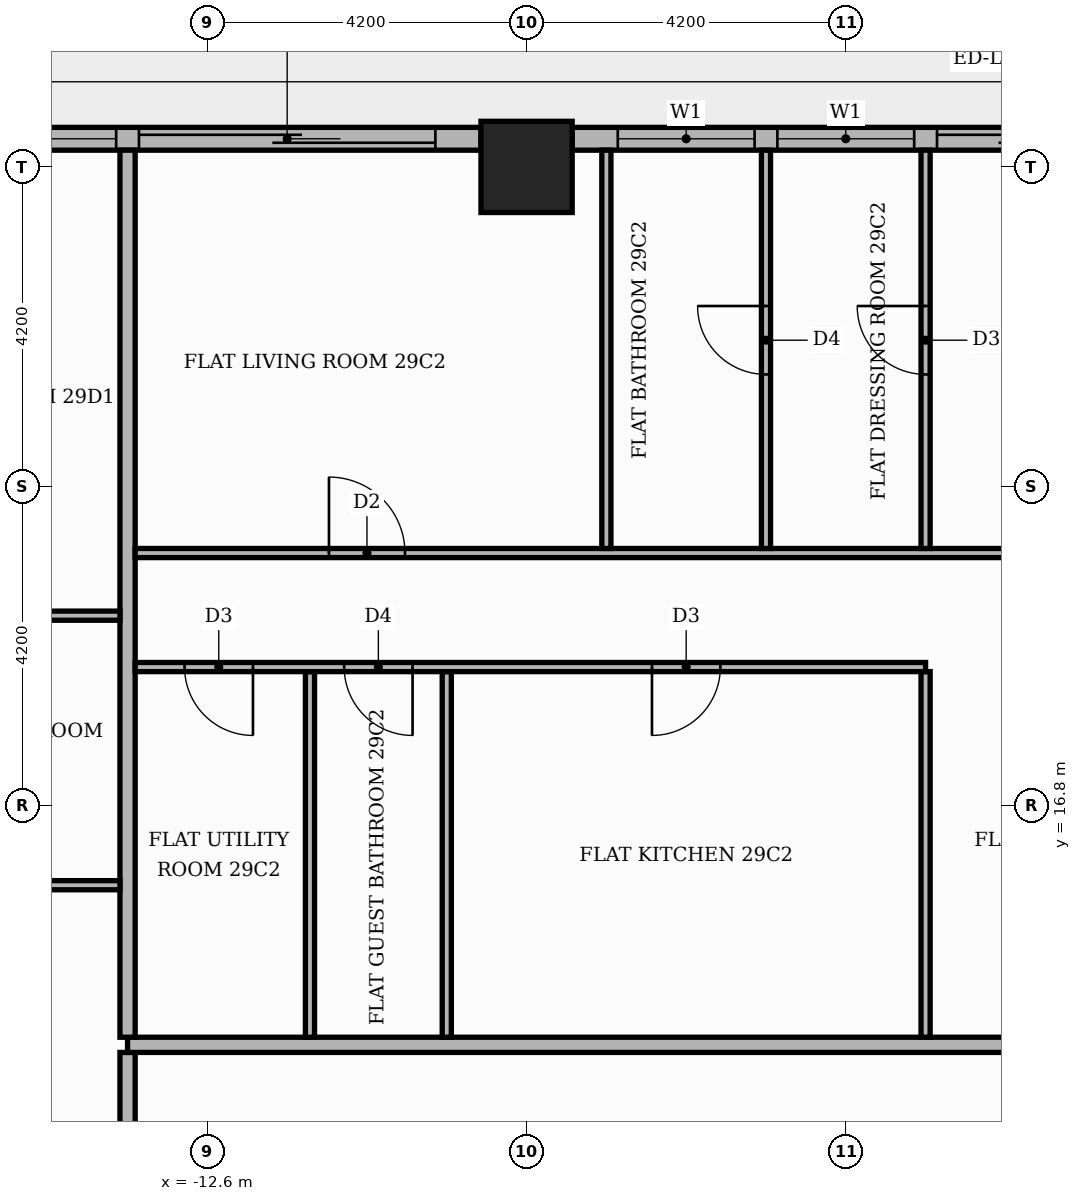
"""IFC4 building model, lengths in metres.
Left out: names, types, materials, properties, quantities, classifications, styles, units other than length and angle.
Written with IfcOpenShell. Run it as: python <this file> out.ifc"""

import sys

from ifc_helpers import new_model, si_unit, direction, frame, frame_2d, origin, origin_2d, place, context, subcontext, project, spatial, rectangle, extrude, element, fill, save


model = new_model("IFC4")
c1 = context("Model", 3, precision=1e-05, world=origin(), true_north=direction((0.0, 1.0)))
c2 = subcontext(c1, "Body", "Model", "MODEL_VIEW")
j1 = project(units=[si_unit("LENGTHUNIT", "METRE"), si_unit("PLANEANGLEUNIT", "RADIAN")], contexts=[c1])
p1 = place(None, origin())
s1 = spatial("IfcSite", under=j1, at=p1, CompositionType="ELEMENT")
p2 = place(p1, origin())
s2 = spatial("IfcBuilding", under=s1, at=p2, CompositionType="ELEMENT")
p3 = place(p2, frame((0.0, 0.0, 122.1)))
s3 = spatial("IfcBuildingStorey", under=s2, at=p3, CompositionType="ELEMENT", Elevation=122.1)
p4 = place(p3, frame((-8.4, 25.2, 0.0), z_axis=(0.0, 0.0, 1.0), x_axis=(1.0, 0.0, 0.0)))
e1 = element("IfcColumn", 1, at=p4, inside=s3, PredefinedType="COLUMN", context=c2, shape_type="SweptSolid", body=[
    extrude(rectangle(XDim=1.2, YDim=1.2, at=origin_2d()), origin(), (0.0, 0.0, 1.0), 3.9),
])
p5 = place(p3, frame((-0.6, 25.57, 0.0), z_axis=(0.0, 0.0, 1.0), x_axis=(-1.0, 0.0, 0.0)))
e2 = element("IfcWall", 2, at=p5, inside=s3, PredefinedType="STANDARD", context=c2, shape_type="SweptSolid", body=[
    extrude(rectangle(XDim=7.2, YDim=0.3, at=frame_2d((3.6, 0.0))), origin(), (0.0, 0.0, 1.0), 3.4),
])
p6 = place(p5, frame((0.6, 0.0, 0.0)))
e3 = element("IfcOpeningElement", 3, at=p6, cuts=e2, PredefinedType="OPENING", context=c2, shape_type="SweptSolid", body=[
    extrude(rectangle(XDim=1.8, YDim=2.4, at=frame_2d((0.9, 1.2))), frame((0.0, 0.16, 0.0), z_axis=(0.0, -1.0, 0.0), x_axis=(1.0, 0.0, 0.0)), (0.0, 0.0, 1.0), 0.32),
])
p7 = place(p5, frame((2.7, 0.0, 0.9)))
e4 = element("IfcOpeningElement", 4, at=p7, cuts=e2, PredefinedType="OPENING", context=c2, shape_type="SweptSolid", body=[
    extrude(rectangle(XDim=1.8, YDim=2.1, at=frame_2d((0.9, 1.05))), frame((0.0, 0.16, 0.0), z_axis=(0.0, -1.0, 0.0), x_axis=(1.0, 0.0, 0.0)), (0.0, 0.0, 1.0), 0.32),
])
p8 = place(p5, frame((4.8, 0.0, 0.9)))
e5 = element("IfcOpeningElement", 5, at=p8, cuts=e2, PredefinedType="OPENING", context=c2, shape_type="SweptSolid", body=[
    extrude(rectangle(XDim=1.8, YDim=2.1, at=frame_2d((0.9, 1.05))), frame((0.0, 0.16, 0.0), z_axis=(0.0, -1.0, 0.0), x_axis=(1.0, 0.0, 0.0)), (0.0, 0.0, 1.0), 0.32),
])
p9 = place(p3, frame((-9.0, 25.57, 0.0), z_axis=(0.0, 0.0, 1.0), x_axis=(-1.0, 0.0, 0.0)))
e6 = element("IfcWall", 6, at=p9, inside=s3, PredefinedType="STANDARD", context=c2, shape_type="SweptSolid", body=[
    extrude(rectangle(XDim=7.2, YDim=0.3, at=frame_2d((3.6, 0.0))), origin(), (0.0, 0.0, 1.0), 3.4),
])
p10 = place(p9, frame((0.6, 0.0, 0.0)))
e7 = element("IfcOpeningElement", 7, at=p10, cuts=e6, PredefinedType="OPENING", context=c2, shape_type="SweptSolid", body=[
    extrude(rectangle(XDim=3.9, YDim=2.4, at=frame_2d((1.95, 1.2))), frame((0.0, 0.16, 0.0), z_axis=(0.0, -1.0, 0.0), x_axis=(1.0, 0.0, 0.0)), (0.0, 0.0, 1.0), 0.32),
])
p11 = place(p9, frame((4.8, 0.0, 0.9)))
e8 = element("IfcOpeningElement", 8, at=p11, cuts=e6, PredefinedType="OPENING", context=c2, shape_type="SweptSolid", body=[
    extrude(rectangle(XDim=1.8, YDim=2.1, at=frame_2d((0.9, 1.05))), frame((0.0, 0.16, 0.0), z_axis=(0.0, -1.0, 0.0), x_axis=(1.0, 0.0, 0.0)), (0.0, 0.0, 1.0), 0.32),
])
p12 = place(p3, frame((-13.65, 5.35, 0.0), z_axis=(0.0, 0.0, 1.0), x_axis=(0.0, 1.0, 0.0)))
e9 = element("IfcWall", 9, at=p12, inside=s3, PredefinedType="PARTITIONING", context=c2, shape_type="SweptSolid", body=[
    extrude(rectangle(XDim=8.2, YDim=0.2, at=frame_2d((4.1, 0.0))), origin(), (0.0, 0.0, 1.0), 3.4),
])
p13 = place(p12, frame((5.65, 0.0, 0.0)))
e10 = element("IfcOpeningElement", 10, at=p13, cuts=e9, PredefinedType="OPENING", context=c2, shape_type="SweptSolid", body=[
    extrude(rectangle(XDim=1.1, YDim=2.4, at=frame_2d((0.55, 1.2))), frame((0.0, 0.11, 0.0), z_axis=(0.0, -1.0, 0.0), x_axis=(1.0, 0.0, 0.0)), (0.0, 0.0, 1.0), 0.22),
])
p14 = place(p3, frame((-13.65, 13.65, 0.0), z_axis=(0.0, 0.0, 1.0), x_axis=(1.0, 0.0, 0.0)))
e11 = element("IfcWall", 11, at=p14, inside=s3, PredefinedType="PARTITIONING", context=c2, shape_type="SweptSolid", body=[
    extrude(rectangle(XDim=39.07, YDim=0.2, at=frame_2d((19.535, 0.0))), origin(), (0.0, 0.0, 1.0), 3.4),
])
p15 = place(p14, frame((24.65, 0.0, 0.0)))
e12 = element("IfcOpeningElement", 12, at=p15, cuts=e11, PredefinedType="OPENING", context=c2, shape_type="SweptSolid", body=[
    extrude(rectangle(XDim=1.1, YDim=2.4, at=frame_2d((0.55, 1.2))), frame((0.0, 0.11, 0.0), z_axis=(0.0, -1.0, 0.0), x_axis=(1.0, 0.0, 0.0)), (0.0, 0.0, 1.0), 0.22),
])
p16 = place(p14, frame((12.05, 0.0, 0.0)))
e13 = element("IfcOpeningElement", 13, at=p16, cuts=e11, PredefinedType="OPENING", context=c2, shape_type="SweptSolid", body=[
    extrude(rectangle(XDim=1.1, YDim=2.4, at=frame_2d((0.55, 1.2))), frame((0.0, 0.11, 0.0), z_axis=(0.0, -1.0, 0.0), x_axis=(1.0, 0.0, 0.0)), (0.0, 0.0, 1.0), 0.22),
])
p17 = place(p3, frame((-13.65, 13.75, 0.0), z_axis=(0.0, 0.0, 1.0), x_axis=(0.0, 1.0, 0.0)))
e14 = element("IfcWall", 14, at=p17, inside=s3, PredefinedType="PARTITIONING", context=c2, shape_type="SweptSolid", body=[
    extrude(rectangle(XDim=11.67, YDim=0.2, at=frame_2d((5.835, 0.0))), origin(), (0.0, 0.0, 1.0), 3.4),
])
for number, where, z_axis, x_axis in (
    (15, (-11.25, 13.75, 0.0), (0.0, 0.0, 1.0), (0.0, 1.0, 0.0)),
    (16, (-9.45, 13.75, 0.0), (0.0, 0.0, 1.0), (0.0, 1.0, 0.0)),
    (17, (-3.15, 13.75, 0.0), (0.0, 0.0, 1.0), (0.0, 1.0, 0.0)),
):
    element("IfcWall", number, at=place(p3, frame(where, z_axis=z_axis, x_axis=x_axis)), inside=s3, PredefinedType="PARTITIONING", context=c2, shape_type="SweptSolid", body=[
        extrude(rectangle(XDim=4.81, YDim=0.12, at=frame_2d((2.405, 0.0))), origin(), (0.0, 0.0, 1.0), 3.4),
    ])
p18 = place(p3, frame((-19.82, 15.75, 0.0), z_axis=(0.0, 0.0, 1.0), x_axis=(1.0, 0.0, 0.0)))
e18 = element("IfcWall", 18, at=p18, inside=s3, PredefinedType="PARTITIONING", context=c2, shape_type="SweptSolid", body=[
    extrude(rectangle(XDim=6.07, YDim=0.12, at=frame_2d((3.035, 0.0))), origin(), (0.0, 0.0, 1.0), 3.4),
])
p19 = place(p18, frame((2.585, 0.0, 0.0)))
e19 = element("IfcOpeningElement", 19, at=p19, cuts=e18, PredefinedType="OPENING", context=c2, shape_type="SweptSolid", body=[
    extrude(rectangle(XDim=1.0, YDim=2.1, at=frame_2d((0.5, 1.05))), frame((0.0, 0.07, 0.0), z_axis=(0.0, -1.0, 0.0), x_axis=(1.0, 0.0, 0.0)), (0.0, 0.0, 1.0), 0.14),
])
p20 = place(p3, frame((-13.55, 18.62, 0.0), z_axis=(0.0, 0.0, 1.0), x_axis=(1.0, 0.0, 0.0)))
e20 = element("IfcWall", 20, at=p20, inside=s3, PredefinedType="PARTITIONING", context=c2, shape_type="SweptSolid", body=[
    extrude(rectangle(XDim=10.4, YDim=0.12, at=frame_2d((5.2, 0.0))), origin(), (0.0, 0.0, 1.0), 3.4),
])
p21 = place(p20, frame((6.8, 0.0, 0.0)))
e21 = element("IfcOpeningElement", 21, at=p21, cuts=e20, PredefinedType="OPENING", context=c2, shape_type="SweptSolid", body=[
    extrude(rectangle(XDim=0.9, YDim=2.1, at=frame_2d((0.45, 1.05))), frame((0.0, 0.07, 0.0), z_axis=(0.0, -1.0, 0.0), x_axis=(1.0, 0.0, 0.0)), (0.0, 0.0, 1.0), 0.14),
])
p22 = place(p20, frame((2.75, 0.0, 0.0)))
e22 = element("IfcOpeningElement", 22, at=p22, cuts=e20, PredefinedType="OPENING", context=c2, shape_type="SweptSolid", body=[
    extrude(rectangle(XDim=0.9, YDim=2.1, at=frame_2d((0.45, 1.05))), frame((0.0, 0.07, 0.0), z_axis=(0.0, -1.0, 0.0), x_axis=(1.0, 0.0, 0.0)), (0.0, 0.0, 1.0), 0.14),
])
p23 = place(p20, frame((0.65, 0.0, 0.0)))
e23 = element("IfcOpeningElement", 23, at=p23, cuts=e20, PredefinedType="OPENING", context=c2, shape_type="SweptSolid", body=[
    extrude(rectangle(XDim=0.9, YDim=2.1, at=frame_2d((0.45, 1.05))), frame((0.0, 0.07, 0.0), z_axis=(0.0, -1.0, 0.0), x_axis=(1.0, 0.0, 0.0)), (0.0, 0.0, 1.0), 0.14),
])
p24 = place(p3, frame((-17.4, 19.296, 0.0), z_axis=(0.0, 0.0, 1.0), x_axis=(1.0, 0.0, 0.0)))
e24 = element("IfcWall", 24, at=p24, inside=s3, PredefinedType="PARTITIONING", context=c2, shape_type="SweptSolid", body=[
    extrude(rectangle(XDim=3.65, YDim=0.12, at=frame_2d((1.825, 0.0))), origin(), (0.0, 0.0, 1.0), 3.4),
])
p25 = place(p3, frame((-13.55, 20.12, 0.0), z_axis=(0.0, 0.0, 1.0), x_axis=(1.0, 0.0, 0.0)))
e25 = element("IfcWall", 25, at=p25, inside=s3, PredefinedType="PARTITIONING", context=c2, shape_type="SweptSolid", body=[
    extrude(rectangle(XDim=18.7, YDim=0.12, at=frame_2d((9.35, 0.0))), origin(), (0.0, 0.0, 1.0), 3.4),
])
p26 = place(p25, frame((14.15, 0.0, 0.0)))
e26 = element("IfcOpeningElement", 26, at=p26, cuts=e25, PredefinedType="OPENING", context=c2, shape_type="SweptSolid", body=[
    extrude(rectangle(XDim=0.9, YDim=2.1, at=frame_2d((0.45, 1.05))), frame((0.0, 0.07, 0.0), z_axis=(0.0, -1.0, 0.0), x_axis=(1.0, 0.0, 0.0)), (0.0, 0.0, 1.0), 0.14),
])
p27 = place(p25, frame((2.55, 0.0, 0.0)))
e27 = element("IfcOpeningElement", 27, at=p27, cuts=e25, PredefinedType="OPENING", context=c2, shape_type="SweptSolid", body=[
    extrude(rectangle(XDim=1.0, YDim=2.1, at=frame_2d((0.5, 1.05))), frame((0.0, 0.07, 0.0), z_axis=(0.0, -1.0, 0.0), x_axis=(1.0, 0.0, 0.0)), (0.0, 0.0, 1.0), 0.14),
])
p28 = place(p3, frame((-7.35, 20.18, 0.0), z_axis=(0.0, 0.0, 1.0), x_axis=(0.0, 1.0, 0.0)))
e28 = element("IfcWall", 28, at=p28, inside=s3, PredefinedType="PARTITIONING", context=c2, shape_type="SweptSolid", body=[
    extrude(rectangle(XDim=5.24, YDim=0.12, at=frame_2d((2.62, 0.0))), origin(), (0.0, 0.0, 1.0), 3.4),
])
p29 = place(p3, frame((-5.25, 20.18, 0.0), z_axis=(0.0, 0.0, 1.0), x_axis=(0.0, 1.0, 0.0)))
e29 = element("IfcWall", 29, at=p29, inside=s3, PredefinedType="PARTITIONING", context=c2, shape_type="SweptSolid", body=[
    extrude(rectangle(XDim=5.24, YDim=0.12, at=frame_2d((2.62, 0.0))), origin(), (0.0, 0.0, 1.0), 3.4),
])
p30 = place(p29, frame((2.29, 0.0, 0.0)))
e30 = element("IfcOpeningElement", 30, at=p30, cuts=e29, PredefinedType="OPENING", context=c2, shape_type="SweptSolid", body=[
    extrude(rectangle(XDim=0.9, YDim=2.1, at=frame_2d((0.45, 1.05))), frame((0.0, 0.07, 0.0), z_axis=(0.0, -1.0, 0.0), x_axis=(1.0, 0.0, 0.0)), (0.0, 0.0, 1.0), 0.14),
])
p31 = place(p3, frame((-3.15, 20.18, 0.0), z_axis=(0.0, 0.0, 1.0), x_axis=(0.0, 1.0, 0.0)))
e31 = element("IfcWall", 31, at=p31, inside=s3, PredefinedType="PARTITIONING", context=c2, shape_type="SweptSolid", body=[
    extrude(rectangle(XDim=5.24, YDim=0.12, at=frame_2d((2.62, 0.0))), origin(), (0.0, 0.0, 1.0), 3.4),
])
p32 = place(p31, frame((2.29, 0.0, 0.0)))
e32 = element("IfcOpeningElement", 32, at=p32, cuts=e31, PredefinedType="OPENING", context=c2, shape_type="SweptSolid", body=[
    extrude(rectangle(XDim=0.9, YDim=2.1, at=frame_2d((0.45, 1.05))), frame((0.0, 0.07, 0.0), z_axis=(0.0, -1.0, 0.0), x_axis=(1.0, 0.0, 0.0)), (0.0, 0.0, 1.0), 0.14),
])
p33 = place(p6, origin())
e33 = element("IfcDoor", 33, at=p33, inside=s3, OperationType="SLIDING_TO_LEFT", PredefinedType="DOOR", context=c2, shape_type="SweptSolid", body=[
    extrude(rectangle(XDim=1.8, YDim=2.4, at=frame_2d((0.9, 1.2))), frame((0.0, 0.025, 0.0), z_axis=(0.0, -1.0, 0.0), x_axis=(1.0, 0.0, 0.0)), (0.0, 0.0, 1.0), 0.05),
])
fill(e3, e33)
p34 = place(p7, origin())
e34 = element("IfcWindow", 34, at=p34, inside=s3, PartitioningType="SINGLE_PANEL", PredefinedType="WINDOW", context=c2, shape_type="SweptSolid", body=[
    extrude(rectangle(XDim=1.8, YDim=2.1, at=frame_2d((0.9, 1.05))), frame((0.0, 0.03, 0.0), z_axis=(0.0, -1.0, 0.0), x_axis=(1.0, 0.0, 0.0)), (0.0, 0.0, 1.0), 0.06),
])
fill(e4, e34)
p35 = place(p8, origin())
e35 = element("IfcWindow", 35, at=p35, inside=s3, PartitioningType="SINGLE_PANEL", PredefinedType="WINDOW", context=c2, shape_type="SweptSolid", body=[
    extrude(rectangle(XDim=1.8, YDim=2.1, at=frame_2d((0.9, 1.05))), frame((0.0, 0.03, 0.0), z_axis=(0.0, -1.0, 0.0), x_axis=(1.0, 0.0, 0.0)), (0.0, 0.0, 1.0), 0.06),
])
fill(e5, e35)
p36 = place(p10, origin())
e36 = element("IfcDoor", 36, at=p36, inside=s3, OperationType="SLIDING_TO_LEFT", PredefinedType="DOOR", context=c2, shape_type="SweptSolid", body=[
    extrude(rectangle(XDim=3.9, YDim=2.4, at=frame_2d((1.95, 1.2))), frame((0.0, 0.025, 0.0), z_axis=(0.0, -1.0, 0.0), x_axis=(1.0, 0.0, 0.0)), (0.0, 0.0, 1.0), 0.05),
])
fill(e7, e36)
p37 = place(p11, origin())
e37 = element("IfcWindow", 37, at=p37, inside=s3, PartitioningType="SINGLE_PANEL", PredefinedType="WINDOW", context=c2, shape_type="SweptSolid", body=[
    extrude(rectangle(XDim=1.8, YDim=2.1, at=frame_2d((0.9, 1.05))), frame((0.0, 0.03, 0.0), z_axis=(0.0, -1.0, 0.0), x_axis=(1.0, 0.0, 0.0)), (0.0, 0.0, 1.0), 0.06),
])
fill(e8, e37)
p38 = place(p21, frame((0.9, 0.0, 0.0), z_axis=(0.0, 0.0, 1.0), x_axis=(-1.0, 0.0, 0.0)))
e38 = element("IfcDoor", 38, at=p38, inside=s3, OperationType="SINGLE_SWING_LEFT", PredefinedType="DOOR", context=c2, shape_type="SweptSolid", body=[
    extrude(rectangle(XDim=0.9, YDim=2.1, at=frame_2d((0.45, 1.05))), frame((0.0, 0.025, 0.0), z_axis=(0.0, -1.0, 0.0), x_axis=(1.0, 0.0, 0.0)), (0.0, 0.0, 1.0), 0.05),
])
fill(e21, e38)
p39 = place(p22, frame((0.9, 0.0, 0.0), z_axis=(0.0, 0.0, 1.0), x_axis=(-1.0, 0.0, 0.0)))
e39 = element("IfcDoor", 39, at=p39, inside=s3, OperationType="SINGLE_SWING_RIGHT", PredefinedType="DOOR", context=c2, shape_type="SweptSolid", body=[
    extrude(rectangle(XDim=0.9, YDim=2.1, at=frame_2d((0.45, 1.05))), frame((0.0, 0.025, 0.0), z_axis=(0.0, -1.0, 0.0), x_axis=(1.0, 0.0, 0.0)), (0.0, 0.0, 1.0), 0.05),
])
fill(e22, e39)
p40 = place(p23, frame((0.9, 0.0, 0.0), z_axis=(0.0, 0.0, 1.0), x_axis=(-1.0, 0.0, 0.0)))
e40 = element("IfcDoor", 40, at=p40, inside=s3, OperationType="SINGLE_SWING_RIGHT", PredefinedType="DOOR", context=c2, shape_type="SweptSolid", body=[
    extrude(rectangle(XDim=0.9, YDim=2.1, at=frame_2d((0.45, 1.05))), frame((0.0, 0.025, 0.0), z_axis=(0.0, -1.0, 0.0), x_axis=(1.0, 0.0, 0.0)), (0.0, 0.0, 1.0), 0.05),
])
fill(e23, e40)
p41 = place(p32, origin())
e41 = element("IfcDoor", 41, at=p41, inside=s3, OperationType="SINGLE_SWING_RIGHT", PredefinedType="DOOR", context=c2, shape_type="SweptSolid", body=[
    extrude(rectangle(XDim=0.9, YDim=2.1, at=frame_2d((0.45, 1.05))), frame((0.0, 0.025, 0.0), z_axis=(0.0, -1.0, 0.0), x_axis=(1.0, 0.0, 0.0)), (0.0, 0.0, 1.0), 0.05),
])
fill(e32, e41)
p42 = place(p30, origin())
e42 = element("IfcDoor", 42, at=p42, inside=s3, OperationType="SINGLE_SWING_RIGHT", PredefinedType="DOOR", context=c2, shape_type="SweptSolid", body=[
    extrude(rectangle(XDim=0.9, YDim=2.1, at=frame_2d((0.45, 1.05))), frame((0.0, 0.025, 0.0), z_axis=(0.0, -1.0, 0.0), x_axis=(1.0, 0.0, 0.0)), (0.0, 0.0, 1.0), 0.05),
])
fill(e30, e42)
p43 = place(p27, origin())
e43 = element("IfcDoor", 43, at=p43, inside=s3, OperationType="SINGLE_SWING_LEFT", PredefinedType="DOOR", context=c2, shape_type="SweptSolid", body=[
    extrude(rectangle(XDim=1.0, YDim=2.1, at=frame_2d((0.5, 1.05))), frame((0.0, 0.025, 0.0), z_axis=(0.0, -1.0, 0.0), x_axis=(1.0, 0.0, 0.0)), (0.0, 0.0, 1.0), 0.05),
])
fill(e27, e43)
save(model, sys.argv[1])
